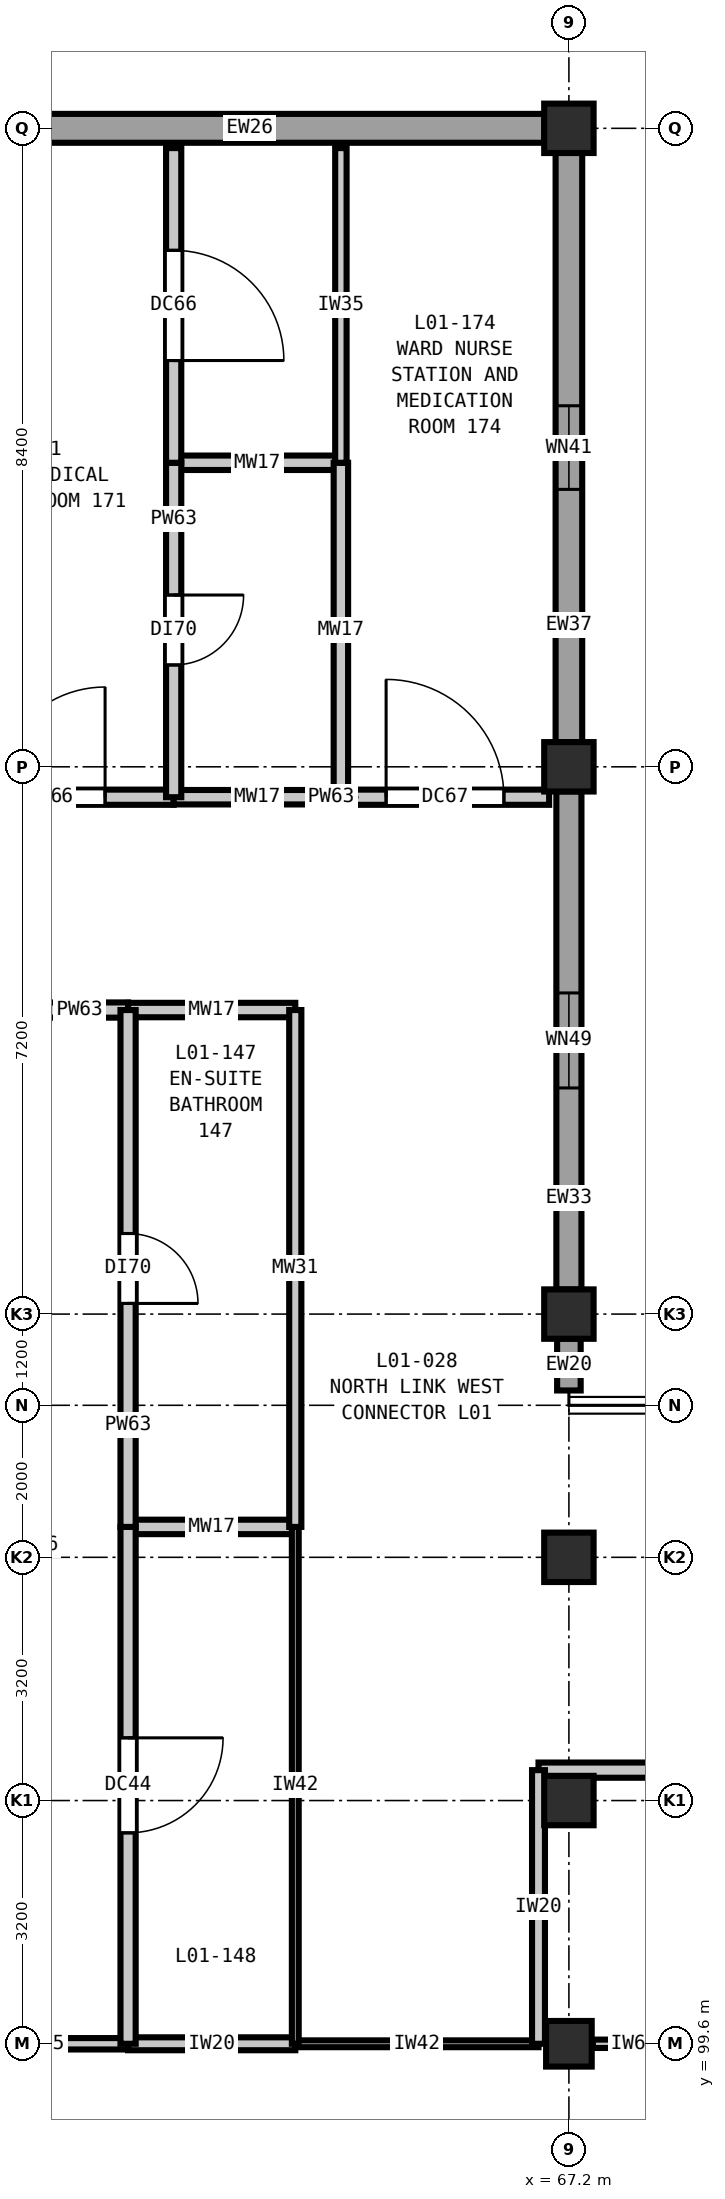
"""IFC4 building model, lengths in metres.
Left out: names, types, materials, properties, quantities, classifications, styles, units other than length and angle.
Written with IfcOpenShell. Run it as: python <this file> out.ifc"""

import sys

from ifc_helpers import new_model, si_unit, direction, frame, frame_2d, origin, origin_2d, place, context, subcontext, project, spatial, rectangle, extrude, element, fill, save


model = new_model("IFC4")
c1 = context("Model", 3, precision=1e-05, world=origin(), true_north=direction((0.0, 1.0)))
c2 = subcontext(c1, "Body", "Model", "MODEL_VIEW")
j1 = project(units=[si_unit("LENGTHUNIT", "METRE"), si_unit("PLANEANGLEUNIT", "RADIAN")], contexts=[c1])
p1 = place(None, origin())
s1 = spatial("IfcSite", under=j1, at=p1, CompositionType="ELEMENT")
p2 = place(p1, origin())
s2 = spatial("IfcBuilding", under=s1, at=p2, CompositionType="ELEMENT")
p3 = place(p2, frame((0.0, 0.0, 5.4)))
s3 = spatial("IfcBuildingStorey", under=s2, at=p3, CompositionType="ELEMENT", Elevation=5.4)
p4 = place(p3, frame((67.2, 99.6, 0.0), z_axis=(0.0, 0.0, 1.0), x_axis=(1.0, 0.0, 0.0)))
e1 = element("IfcColumn", 1, at=p4, inside=s3, PredefinedType="COLUMN", context=c2, shape_type="SweptSolid", body=[
    extrude(rectangle(XDim=0.6, YDim=0.6, at=origin_2d()), origin(), (0.0, 0.0, 1.0), 5.4),
])
for number, where, z_axis, x_axis in (
    (2, (67.2, 102.8, 0.0), (0.0, 0.0, 1.0), (1.0, 0.0, 0.0)),
    (3, (67.2, 106.0, 0.0), (0.0, 0.0, 1.0), (1.0, 0.0, 0.0)),
    (4, (67.2, 109.2, 0.0), (0.0, 0.0, 1.0), (1.0, 0.0, 0.0)),
    (5, (67.2, 116.4, 0.0), (0.0, 0.0, 1.0), (1.0, 0.0, 0.0)),
    (6, (67.2, 124.8, 0.0), (0.0, 0.0, 1.0), (1.0, 0.0, 0.0)),
):
    element("IfcColumn", number, at=place(p3, frame(where, z_axis=z_axis, x_axis=x_axis)), inside=s3, PredefinedType="COLUMN", context=c2, shape_type="SweptSolid", body=[
        extrude(rectangle(XDim=0.65, YDim=0.65, at=origin_2d()), origin(), (0.0, 0.0, 1.0), 5.4),
    ])
p5 = place(p3, frame((59.123, 124.8, 0.0), z_axis=(0.0, 0.0, 1.0), x_axis=(1.0, 0.0, 0.0)))
e7 = element("IfcWall", 7, at=p5, inside=s3, PredefinedType="SOLIDWALL", context=c2, shape_type="SweptSolid", body=[
    extrude(rectangle(XDim=7.754, YDim=0.38, at=frame_2d((3.877, 0.0))), origin(), (0.0, 0.0, 1.0), 4.68),
])
p6 = place(p3, frame((67.2, 124.477, 0.0), z_axis=(0.0, 0.0, 1.0), x_axis=(0.0, -1.0, 0.0)))
e8 = element("IfcWall", 8, at=p6, inside=s3, PredefinedType="SOLIDWALL", context=c2, shape_type="SweptSolid", body=[
    extrude(rectangle(XDim=7.754, YDim=0.35, at=frame_2d((3.877, 0.0))), origin(), (0.0, 0.0, 1.0), 4.68),
])
p7 = place(p6, frame((3.327, 0.0, 0.9)))
e9 = element("IfcOpeningElement", 9, at=p7, cuts=e8, PredefinedType="OPENING", context=c2, shape_type="SweptSolid", body=[
    extrude(rectangle(XDim=1.1, YDim=1.95, at=frame_2d((0.55, 0.975))), frame((0.0, 0.185, 0.0), z_axis=(0.0, -1.0, 0.0), x_axis=(1.0, 0.0, 0.0)), (0.0, 0.0, 1.0), 0.37),
])
p8 = place(p3, frame((67.2, 116.077, 0.0), z_axis=(0.0, 0.0, 1.0), x_axis=(0.0, -1.0, 0.0)))
e10 = element("IfcWall", 10, at=p8, inside=s3, PredefinedType="SOLIDWALL", context=c2, shape_type="SweptSolid", body=[
    extrude(rectangle(XDim=6.554, YDim=0.33, at=frame_2d((3.277, 0.0))), origin(), (0.0, 0.0, 1.0), 4.68),
])
p9 = place(p8, frame((2.652, 0.0, 0.9)))
e11 = element("IfcOpeningElement", 11, at=p9, cuts=e10, PredefinedType="OPENING", context=c2, shape_type="SweptSolid", body=[
    extrude(rectangle(XDim=1.25, YDim=1.95, at=frame_2d((0.625, 0.975))), frame((0.0, 0.175, 0.0), z_axis=(0.0, -1.0, 0.0), x_axis=(1.0, 0.0, 0.0)), (0.0, 0.0, 1.0), 0.35),
])
p10 = place(p3, frame((67.2, 108.877, 0.0), z_axis=(0.0, 0.0, 1.0), x_axis=(0.0, -1.0, 0.0)))
e12 = element("IfcWall", 12, at=p10, inside=s3, PredefinedType="SOLIDWALL", context=c2, shape_type="SweptSolid", body=[
    extrude(rectangle(XDim=0.682, YDim=0.31, at=frame_2d((0.341, 0.0))), origin(), (0.0, 0.0, 1.0), 4.68),
])
p11 = place(p3, frame((59.115, 99.6, 0.0), z_axis=(0.0, 0.0, 1.0), x_axis=(1.0, 0.0, 0.0)))
e13 = element("IfcWall", 13, at=p11, inside=s3, PredefinedType="PARTITIONING", context=c2, shape_type="SweptSolid", body=[
    extrude(rectangle(XDim=2.285, YDim=0.15, at=frame_2d((1.143, 0.0))), origin(), (0.0, 0.0, 1.0), 4.685),
])
p12 = place(p3, frame((61.4, 99.6, 0.0), z_axis=(0.0, 0.0, 1.0), x_axis=(1.0, 0.0, 0.0)))
e14 = element("IfcWall", 14, at=p12, inside=s3, PredefinedType="PARTITIONING", context=c2, shape_type="SweptSolid", body=[
    extrude(rectangle(XDim=2.2, YDim=0.17, at=frame_2d((1.1, 0.0))), origin(), (0.0, 0.0, 1.0), 4.685),
])
p13 = place(p3, frame((63.6, 99.6, 0.0), z_axis=(0.0, 0.0, 1.0), x_axis=(1.0, 0.0, 0.0)))
e15 = element("IfcWall", 15, at=p13, inside=s3, PredefinedType="PARTITIONING", context=c2, shape_type="SweptSolid", body=[
    extrude(rectangle(XDim=3.2, YDim=0.09, at=frame_2d((1.6, 0.0))), origin(), (0.0, 0.0, 1.0), 4.685),
])
p14 = place(p3, frame((67.515, 99.6, 0.0), z_axis=(0.0, 0.0, 1.0), x_axis=(1.0, 0.0, 0.0)))
e16 = element("IfcWall", 16, at=p14, inside=s3, PredefinedType="PARTITIONING", context=c2, shape_type="SweptSolid", body=[
    extrude(rectangle(XDim=1.085, YDim=0.11, at=frame_2d((0.542, 0.0))), origin(), (0.0, 0.0, 1.0), 4.685),
])
p15 = place(p3, frame((66.8, 103.2, 0.0), z_axis=(0.0, 0.0, 1.0), x_axis=(1.0, 0.0, 0.0)))
e17 = element("IfcWall", 17, at=p15, inside=s3, PredefinedType="PARTITIONING", context=c2, shape_type="SweptSolid", body=[
    extrude(rectangle(XDim=6.2, YDim=0.2, at=frame_2d((3.1, 0.0))), origin(), (0.0, 0.0, 1.0), 5.05),
])
p16 = place(p15, frame((2.25, 0.0, 0.0)))
e18 = element("IfcOpeningElement", 18, at=p16, cuts=e17, PredefinedType="OPENING", context=c2, shape_type="SweptSolid", body=[
    extrude(rectangle(XDim=1.7, YDim=2.3, at=frame_2d((0.85, 1.15))), frame((0.0, 0.11, 0.0), z_axis=(0.0, -1.0, 0.0), x_axis=(1.0, 0.0, 0.0)), (0.0, 0.0, 1.0), 0.22),
])
p17 = place(p3, frame((61.4, 106.4, 0.0), z_axis=(0.0, 0.0, 1.0), x_axis=(1.0, 0.0, 0.0)))
e19 = element("IfcWall", 19, at=p17, inside=s3, PredefinedType="PLUMBINGWALL", context=c2, shape_type="SweptSolid", body=[
    extrude(rectangle(XDim=2.2, YDim=0.19, at=frame_2d((1.1, 0.0))), origin(), (0.0, 0.0, 1.0), 5.05),
])
p18 = place(p3, frame((56.8, 113.2, 0.0), z_axis=(0.0, 0.0, 1.0), x_axis=(1.0, 0.0, 0.0)))
e20 = element("IfcWall", 20, at=p18, inside=s3, PredefinedType="PARTITIONING", context=c2, shape_type="SweptSolid", body=[
    extrude(rectangle(XDim=4.6, YDim=0.2, at=frame_2d((2.3, 0.0))), origin(), (0.0, 0.0, 1.0), 5.05),
])
p19 = place(p18, frame((1.525, 0.0, 0.0)))
e21 = element("IfcOpeningElement", 21, at=p19, cuts=e20, PredefinedType="OPENING", context=c2, shape_type="SweptSolid", body=[
    extrude(rectangle(XDim=1.55, YDim=2.25, at=frame_2d((0.775, 1.125))), frame((0.0, 0.11, 0.0), z_axis=(0.0, -1.0, 0.0), x_axis=(1.0, 0.0, 0.0)), (0.0, 0.0, 1.0), 0.22),
])
p20 = place(p3, frame((61.4, 113.2, 0.0), z_axis=(0.0, 0.0, 1.0), x_axis=(1.0, 0.0, 0.0)))
e22 = element("IfcWall", 22, at=p20, inside=s3, PredefinedType="PLUMBINGWALL", context=c2, shape_type="SweptSolid", body=[
    extrude(rectangle(XDim=2.2, YDim=0.19, at=frame_2d((1.1, 0.0))), origin(), (0.0, 0.0, 1.0), 5.05),
])
p21 = place(p3, frame((58.0, 116.0, 0.0), z_axis=(0.0, 0.0, 1.0), x_axis=(1.0, 0.0, 0.0)))
e23 = element("IfcWall", 23, at=p21, inside=s3, PredefinedType="PARTITIONING", context=c2, shape_type="SweptSolid", body=[
    extrude(rectangle(XDim=4.0, YDim=0.2, at=frame_2d((2.0, 0.0))), origin(), (0.0, 0.0, 1.0), 5.05),
])
p22 = place(p21, frame((1.648, 0.0, 0.0)))
e24 = element("IfcOpeningElement", 24, at=p22, cuts=e23, PredefinedType="OPENING", context=c2, shape_type="SweptSolid", body=[
    extrude(rectangle(XDim=1.45, YDim=2.25, at=frame_2d((0.725, 1.125))), frame((0.0, 0.11, 0.0), z_axis=(0.0, -1.0, 0.0), x_axis=(1.0, 0.0, 0.0)), (0.0, 0.0, 1.0), 0.22),
])
p23 = place(p3, frame((62.0, 116.0, 0.0), z_axis=(0.0, 0.0, 1.0), x_axis=(1.0, 0.0, 0.0)))
e25 = element("IfcWall", 25, at=p23, inside=s3, PredefinedType="PLUMBINGWALL", context=c2, shape_type="SweptSolid", body=[
    extrude(rectangle(XDim=2.2, YDim=0.19, at=frame_2d((1.1, 0.0))), origin(), (0.0, 0.0, 1.0), 5.05),
])
p24 = place(p3, frame((64.2, 116.0, 0.0), z_axis=(0.0, 0.0, 1.0), x_axis=(1.0, 0.0, 0.0)))
e26 = element("IfcWall", 26, at=p24, inside=s3, PredefinedType="PARTITIONING", context=c2, shape_type="SweptSolid", body=[
    extrude(rectangle(XDim=2.74, YDim=0.2, at=frame_2d((1.37, 0.0))), origin(), (0.0, 0.0, 1.0), 5.05),
])
p25 = place(p24, frame((0.595, 0.0, 0.0)))
e27 = element("IfcOpeningElement", 27, at=p25, cuts=e26, PredefinedType="OPENING", context=c2, shape_type="SweptSolid", body=[
    extrude(rectangle(XDim=1.55, YDim=2.25, at=frame_2d((0.775, 1.125))), frame((0.0, 0.11, 0.0), z_axis=(0.0, -1.0, 0.0), x_axis=(1.0, 0.0, 0.0)), (0.0, 0.0, 1.0), 0.22),
])
p26 = place(p3, frame((62.0, 120.4, 0.0), z_axis=(0.0, 0.0, 1.0), x_axis=(1.0, 0.0, 0.0)))
e28 = element("IfcWall", 28, at=p26, inside=s3, PredefinedType="PLUMBINGWALL", context=c2, shape_type="SweptSolid", body=[
    extrude(rectangle(XDim=2.2, YDim=0.19, at=frame_2d((1.1, 0.0))), origin(), (0.0, 0.0, 1.0), 5.05),
])
p27 = place(p3, frame((61.4, 99.6, 0.0), z_axis=(0.0, 0.0, 1.0), x_axis=(0.0, 1.0, 0.0)))
e29 = element("IfcWall", 29, at=p27, inside=s3, PredefinedType="PARTITIONING", context=c2, shape_type="SweptSolid", body=[
    extrude(rectangle(XDim=6.8, YDim=0.2, at=frame_2d((3.4, 0.0))), origin(), (0.0, 0.0, 1.0), 5.05),
])
p28 = place(p27, frame((2.775, 0.0, 0.0)))
e30 = element("IfcOpeningElement", 30, at=p28, cuts=e29, PredefinedType="OPENING", context=c2, shape_type="SweptSolid", body=[
    extrude(rectangle(XDim=1.25, YDim=2.15, at=frame_2d((0.625, 1.075))), frame((0.0, 0.11, 0.0), z_axis=(0.0, -1.0, 0.0), x_axis=(1.0, 0.0, 0.0)), (0.0, 0.0, 1.0), 0.22),
])
p29 = place(p3, frame((61.4, 106.4, 0.0), z_axis=(0.0, 0.0, 1.0), x_axis=(0.0, 1.0, 0.0)))
e31 = element("IfcWall", 31, at=p29, inside=s3, PredefinedType="PARTITIONING", context=c2, shape_type="SweptSolid", body=[
    extrude(rectangle(XDim=6.8, YDim=0.2, at=frame_2d((3.4, 0.0))), origin(), (0.0, 0.0, 1.0), 5.05),
])
p30 = place(p29, frame((2.94, 0.0, 0.0)))
e32 = element("IfcOpeningElement", 32, at=p30, cuts=e31, PredefinedType="OPENING", context=c2, shape_type="SweptSolid", body=[
    extrude(rectangle(XDim=0.92, YDim=2.1, at=frame_2d((0.46, 1.05))), frame((0.0, 0.11, 0.0), z_axis=(0.0, -1.0, 0.0), x_axis=(1.0, 0.0, 0.0)), (0.0, 0.0, 1.0), 0.22),
])
p31 = place(p3, frame((62.0, 116.0, 0.0), z_axis=(0.0, 0.0, 1.0), x_axis=(0.0, 1.0, 0.0)))
e33 = element("IfcWall", 33, at=p31, inside=s3, PredefinedType="PARTITIONING", context=c2, shape_type="SweptSolid", body=[
    extrude(rectangle(XDim=4.4, YDim=0.2, at=frame_2d((2.2, 0.0))), origin(), (0.0, 0.0, 1.0), 5.05),
])
p32 = place(p31, frame((1.74, 0.0, 0.0)))
e34 = element("IfcOpeningElement", 34, at=p32, cuts=e33, PredefinedType="OPENING", context=c2, shape_type="SweptSolid", body=[
    extrude(rectangle(XDim=0.92, YDim=2.1, at=frame_2d((0.46, 1.05))), frame((0.0, 0.11, 0.0), z_axis=(0.0, -1.0, 0.0), x_axis=(1.0, 0.0, 0.0)), (0.0, 0.0, 1.0), 0.22),
])
p33 = place(p3, frame((62.0, 120.4, 0.0), z_axis=(0.0, 0.0, 1.0), x_axis=(0.0, 1.0, 0.0)))
e35 = element("IfcWall", 35, at=p33, inside=s3, PredefinedType="PARTITIONING", context=c2, shape_type="SweptSolid", body=[
    extrude(rectangle(XDim=4.14, YDim=0.2, at=frame_2d((2.07, 0.0))), origin(), (0.0, 0.0, 1.0), 5.05),
])
p34 = place(p33, frame((1.345, 0.0, 0.0)))
e36 = element("IfcOpeningElement", 36, at=p34, cuts=e35, PredefinedType="OPENING", context=c2, shape_type="SweptSolid", body=[
    extrude(rectangle(XDim=1.45, YDim=2.25, at=frame_2d((0.725, 1.125))), frame((0.0, 0.11, 0.0), z_axis=(0.0, -1.0, 0.0), x_axis=(1.0, 0.0, 0.0)), (0.0, 0.0, 1.0), 0.22),
])
p35 = place(p3, frame((63.6, 99.6, 0.0), z_axis=(0.0, 0.0, 1.0), x_axis=(0.0, 1.0, 0.0)))
e37 = element("IfcWall", 37, at=p35, inside=s3, PredefinedType="PARTITIONING", context=c2, shape_type="SweptSolid", body=[
    extrude(rectangle(XDim=6.8, YDim=0.09, at=frame_2d((3.4, 0.0))), origin(), (0.0, 0.0, 1.0), 5.05),
])
p36 = place(p3, frame((63.6, 106.4, 0.0), z_axis=(0.0, 0.0, 1.0), x_axis=(0.0, 1.0, 0.0)))
e38 = element("IfcWall", 38, at=p36, inside=s3, PredefinedType="PLUMBINGWALL", context=c2, shape_type="SweptSolid", body=[
    extrude(rectangle(XDim=6.8, YDim=0.16, at=frame_2d((3.4, 0.0))), origin(), (0.0, 0.0, 1.0), 5.05),
])
p37 = place(p3, frame((64.2, 116.0, 0.0), z_axis=(0.0, 0.0, 1.0), x_axis=(0.0, 1.0, 0.0)))
e39 = element("IfcWall", 39, at=p37, inside=s3, PredefinedType="PLUMBINGWALL", context=c2, shape_type="SweptSolid", body=[
    extrude(rectangle(XDim=4.4, YDim=0.19, at=frame_2d((2.2, 0.0))), origin(), (0.0, 0.0, 1.0), 5.05),
])
p38 = place(p3, frame((64.2, 120.4, 0.0), z_axis=(0.0, 0.0, 1.0), x_axis=(0.0, 1.0, 0.0)))
e40 = element("IfcWall", 40, at=p38, inside=s3, PredefinedType="PARTITIONING", context=c2, shape_type="SweptSolid", body=[
    extrude(rectangle(XDim=4.14, YDim=0.15, at=frame_2d((2.07, 0.0))), origin(), (0.0, 0.0, 1.0), 5.05),
])
p39 = place(p3, frame((66.8, 99.6, 0.0), z_axis=(0.0, 0.0, 1.0), x_axis=(0.0, 1.0, 0.0)))
e41 = element("IfcWall", 41, at=p39, inside=s3, PredefinedType="PARTITIONING", context=c2, shape_type="SweptSolid", body=[
    extrude(rectangle(XDim=3.6, YDim=0.17, at=frame_2d((1.8, 0.0))), origin(), (0.0, 0.0, 1.0), 5.05),
])
p40 = place(p7, origin())
e42 = element("IfcWindow", 42, at=p40, inside=s3, PartitioningType="SINGLE_PANEL", PredefinedType="WINDOW", context=c2, shape_type="SweptSolid", body=[
    extrude(rectangle(XDim=1.1, YDim=1.95, at=frame_2d((0.55, 0.975))), frame((0.0, 0.03, 0.0), z_axis=(0.0, -1.0, 0.0), x_axis=(1.0, 0.0, 0.0)), (0.0, 0.0, 1.0), 0.06),
])
fill(e9, e42)
p41 = place(p9, origin())
e43 = element("IfcWindow", 43, at=p41, inside=s3, PartitioningType="SINGLE_PANEL", PredefinedType="WINDOW", context=c2, shape_type="SweptSolid", body=[
    extrude(rectangle(XDim=1.25, YDim=1.95, at=frame_2d((0.625, 0.975))), frame((0.0, 0.03, 0.0), z_axis=(0.0, -1.0, 0.0), x_axis=(1.0, 0.0, 0.0)), (0.0, 0.0, 1.0), 0.06),
])
fill(e11, e43)
p42 = place(p22, origin())
e44 = element("IfcDoor", 44, at=p42, inside=s3, OperationType="SINGLE_SWING_RIGHT", PredefinedType="DOOR", context=c2, shape_type="SweptSolid", body=[
    extrude(rectangle(XDim=1.45, YDim=2.25, at=frame_2d((0.725, 1.125))), frame((0.0, 0.025, 0.0), z_axis=(0.0, -1.0, 0.0), x_axis=(1.0, 0.0, 0.0)), (0.0, 0.0, 1.0), 0.05),
])
fill(e24, e44)
p43 = place(p25, origin())
e45 = element("IfcDoor", 45, at=p43, inside=s3, OperationType="SINGLE_SWING_LEFT", PredefinedType="DOOR", context=c2, shape_type="SweptSolid", body=[
    extrude(rectangle(XDim=1.55, YDim=2.25, at=frame_2d((0.775, 1.125))), frame((0.0, 0.025, 0.0), z_axis=(0.0, -1.0, 0.0), x_axis=(1.0, 0.0, 0.0)), (0.0, 0.0, 1.0), 0.05),
])
fill(e27, e45)
p44 = place(p28, frame((1.25, 0.0, 0.0), z_axis=(0.0, 0.0, 1.0), x_axis=(-1.0, 0.0, 0.0)))
e46 = element("IfcDoor", 46, at=p44, inside=s3, OperationType="SINGLE_SWING_LEFT", PredefinedType="DOOR", context=c2, shape_type="SweptSolid", body=[
    extrude(rectangle(XDim=1.25, YDim=2.15, at=frame_2d((0.625, 1.075))), frame((0.0, 0.025, 0.0), z_axis=(0.0, -1.0, 0.0), x_axis=(1.0, 0.0, 0.0)), (0.0, 0.0, 1.0), 0.05),
])
fill(e30, e46)
p45 = place(p30, frame((0.92, 0.0, 0.0), z_axis=(0.0, 0.0, 1.0), x_axis=(-1.0, 0.0, 0.0)))
e47 = element("IfcDoor", 47, at=p45, inside=s3, OperationType="SINGLE_SWING_RIGHT", PredefinedType="DOOR", context=c2, shape_type="SweptSolid", body=[
    extrude(rectangle(XDim=0.92, YDim=2.1, at=frame_2d((0.46, 1.05))), frame((0.0, 0.025, 0.0), z_axis=(0.0, -1.0, 0.0), x_axis=(1.0, 0.0, 0.0)), (0.0, 0.0, 1.0), 0.05),
])
fill(e32, e47)
p46 = place(p32, frame((0.92, 0.0, 0.0), z_axis=(0.0, 0.0, 1.0), x_axis=(-1.0, 0.0, 0.0)))
e48 = element("IfcDoor", 48, at=p46, inside=s3, OperationType="SINGLE_SWING_LEFT", PredefinedType="DOOR", context=c2, shape_type="SweptSolid", body=[
    extrude(rectangle(XDim=0.92, YDim=2.1, at=frame_2d((0.46, 1.05))), frame((0.0, 0.025, 0.0), z_axis=(0.0, -1.0, 0.0), x_axis=(1.0, 0.0, 0.0)), (0.0, 0.0, 1.0), 0.05),
])
fill(e34, e48)
p47 = place(p34, frame((1.45, 0.0, 0.0), z_axis=(0.0, 0.0, 1.0), x_axis=(-1.0, 0.0, 0.0)))
e49 = element("IfcDoor", 49, at=p47, inside=s3, OperationType="SINGLE_SWING_RIGHT", PredefinedType="DOOR", context=c2, shape_type="SweptSolid", body=[
    extrude(rectangle(XDim=1.45, YDim=2.25, at=frame_2d((0.725, 1.125))), frame((0.0, 0.025, 0.0), z_axis=(0.0, -1.0, 0.0), x_axis=(1.0, 0.0, 0.0)), (0.0, 0.0, 1.0), 0.05),
])
fill(e36, e49)
save(model, sys.argv[1])
